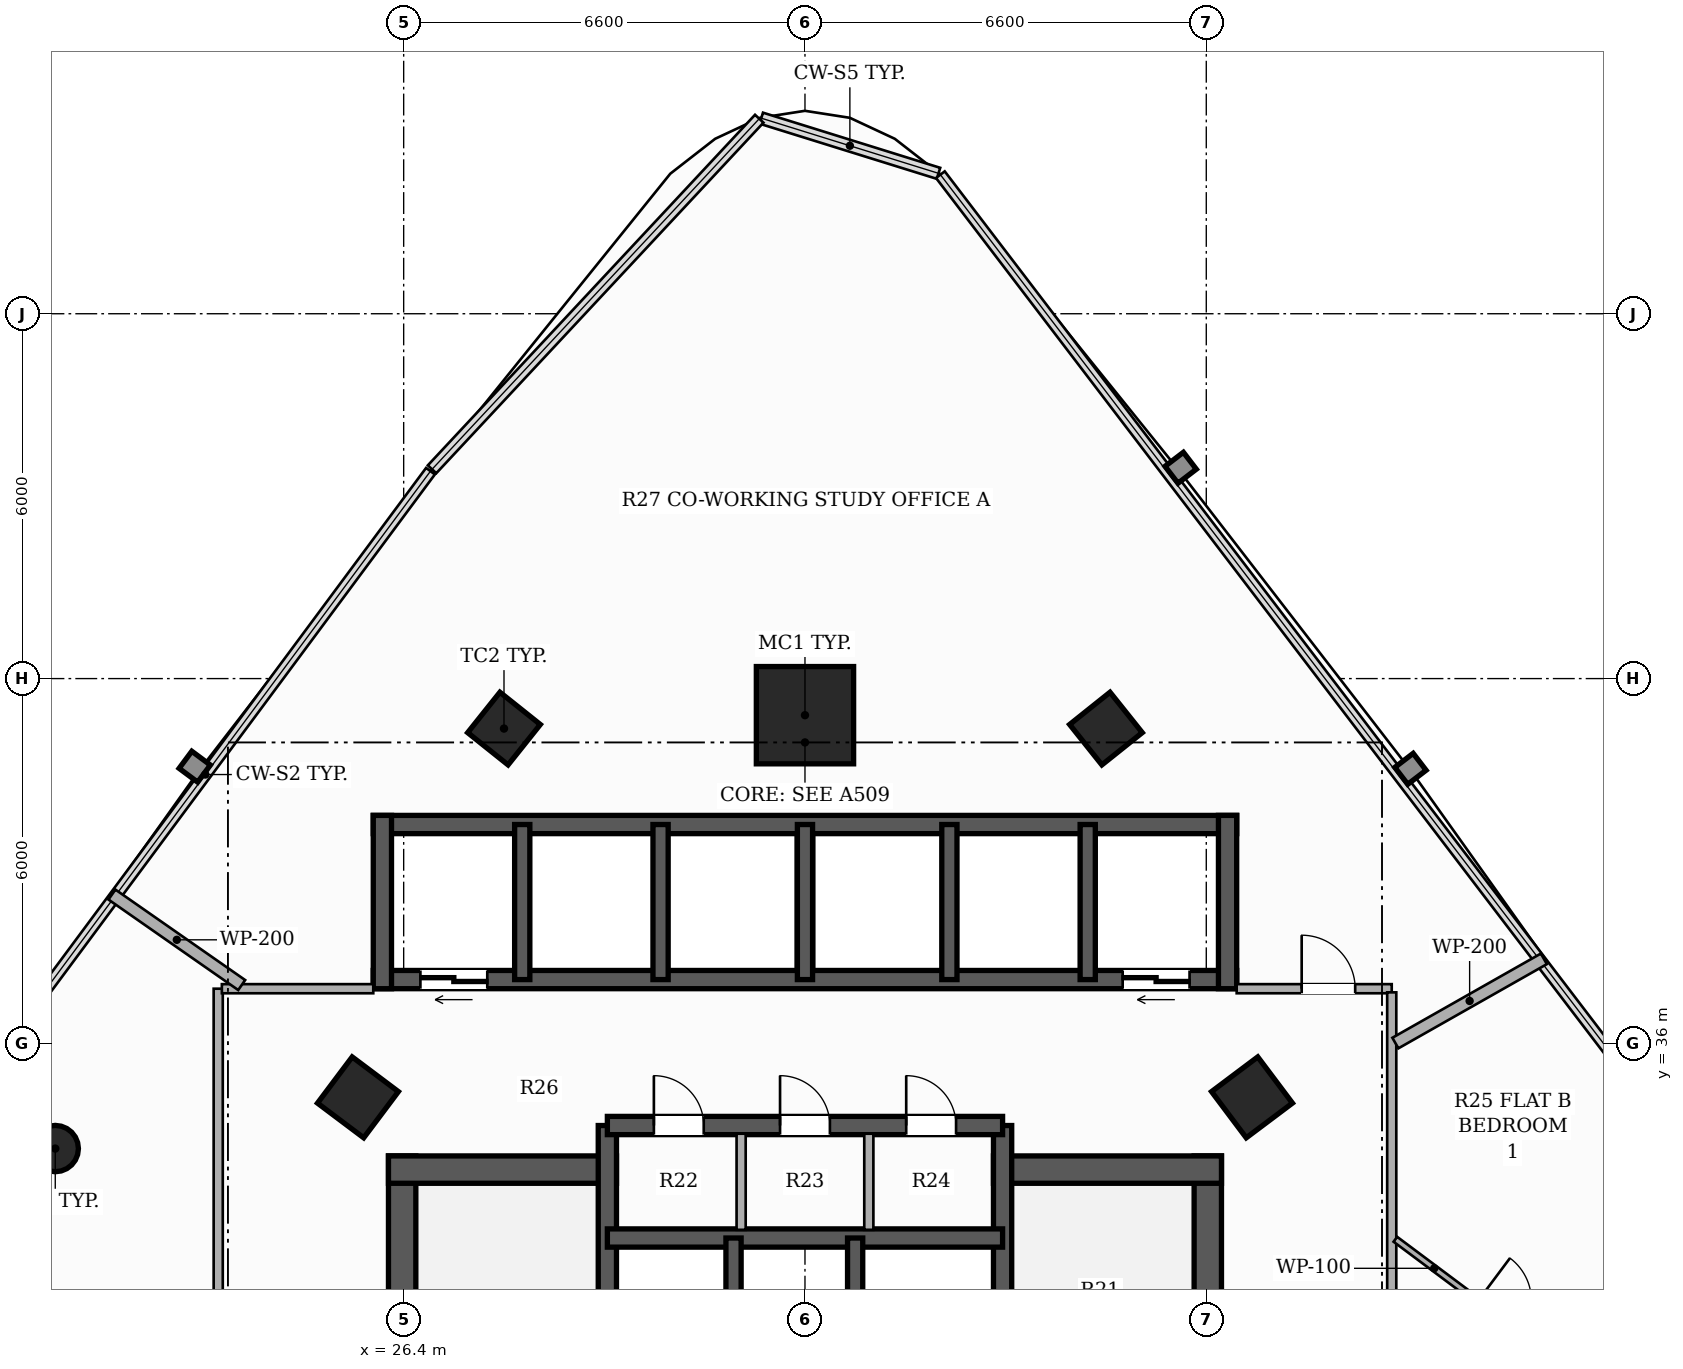
"""IFC4 building model, lengths in metres.
Left out: names, types, materials, properties, quantities, classifications, styles, units other than length and angle.
Written with IfcOpenShell. Run it as: python <this file> out.ifc"""

import sys

from ifc_helpers import new_model, si_unit, direction, frame, frame_2d, origin, origin_2d, place, context, subcontext, project, spatial, rectangle, hollow_rectangle, hollow_circle, extrude, element, fill, save


model = new_model("IFC4")
c1 = context("Model", 3, precision=1e-05, world=origin(), true_north=direction((0.0, 1.0)))
c2 = subcontext(c1, "Body", "Model", "MODEL_VIEW")
j1 = project(units=[si_unit("LENGTHUNIT", "METRE"), si_unit("PLANEANGLEUNIT", "RADIAN")], contexts=[c1])
p1 = place(None, origin())
s1 = spatial("IfcSite", under=j1, at=p1, CompositionType="ELEMENT")
p2 = place(p1, origin())
s2 = spatial("IfcBuilding", under=s1, at=p2, CompositionType="ELEMENT")
p3 = place(p2, frame((0.0, 0.0, 64.25)))
s3 = spatial("IfcBuildingStorey", under=s2, at=p3, CompositionType="ELEMENT", Elevation=64.25)
p4 = place(p3, frame((26.375, 26.45, 0.0), z_axis=(0.0, 0.0, 1.0), x_axis=(0.0, 1.0, 0.0)))
e1 = element("IfcWall", 1, at=p4, inside=s3, PredefinedType="SHEAR", context=c2, shape_type="SweptSolid", body=[
    extrude(rectangle(XDim=7.7, YDim=0.45, at=frame_2d((3.85, 0.0))), origin(), (0.0, 0.0, 1.0), 3.3),
])
p5 = place(p3, frame((26.15, 33.925, 0.0), z_axis=(0.0, 0.0, 1.0), x_axis=(1.0, 0.0, 0.0)))
e2 = element("IfcWall", 2, at=p5, inside=s3, PredefinedType="SHEAR", context=c2, shape_type="SweptSolid", body=[
    extrude(rectangle(XDim=3.75, YDim=0.45, at=frame_2d((1.875, 0.0))), origin(), (0.0, 0.0, 1.0), 3.3),
])
p6 = place(p3, frame((39.625, 26.45, 0.0), z_axis=(0.0, 0.0, 1.0), x_axis=(0.0, 1.0, 0.0)))
e3 = element("IfcWall", 3, at=p6, inside=s3, PredefinedType="SHEAR", context=c2, shape_type="SweptSolid", body=[
    extrude(rectangle(XDim=7.7, YDim=0.45, at=frame_2d((3.85, 0.0))), origin(), (0.0, 0.0, 1.0), 3.3),
])
p7 = place(p3, frame((36.1, 33.925, 0.0), z_axis=(0.0, 0.0, 1.0), x_axis=(1.0, 0.0, 0.0)))
e4 = element("IfcWall", 4, at=p7, inside=s3, PredefinedType="SHEAR", context=c2, shape_type="SweptSolid", body=[
    extrude(rectangle(XDim=3.75, YDim=0.45, at=frame_2d((1.875, 0.0))), origin(), (0.0, 0.0, 1.0), 3.3),
])
p8 = place(p3, frame((29.75, 26.45, 0.0), z_axis=(0.0, 0.0, 1.0), x_axis=(0.0, 1.0, 0.0)))
e5 = element("IfcWall", 5, at=p8, inside=s3, PredefinedType="SHEAR", context=c2, shape_type="SweptSolid", body=[
    extrude(rectangle(XDim=8.2, YDim=0.3, at=frame_2d((4.1, 0.0))), origin(), (0.0, 0.0, 1.0), 3.3),
])
p9 = place(p8, frame((0.6, 0.0, 0.0)))
e6 = element("IfcOpeningElement", 6, at=p9, cuts=e5, PredefinedType="OPENING", context=c2, shape_type="SweptSolid", body=[
    extrude(rectangle(XDim=1.05, YDim=2.15, at=frame_2d((0.525, 1.075))), frame((0.0, 0.16, 0.0), z_axis=(0.0, -1.0, 0.0), x_axis=(1.0, 0.0, 0.0)), (0.0, 0.0, 1.0), 0.32),
])
p10 = place(p3, frame((36.25, 26.45, 0.0), z_axis=(0.0, 0.0, 1.0), x_axis=(0.0, 1.0, 0.0)))
e7 = element("IfcWall", 7, at=p10, inside=s3, PredefinedType="SHEAR", context=c2, shape_type="SweptSolid", body=[
    extrude(rectangle(XDim=8.2, YDim=0.3, at=frame_2d((4.1, 0.0))), origin(), (0.0, 0.0, 1.0), 3.3),
])
p11 = place(p10, frame((0.6, 0.0, 0.0)))
e8 = element("IfcOpeningElement", 8, at=p11, cuts=e7, PredefinedType="OPENING", context=c2, shape_type="SweptSolid", body=[
    extrude(rectangle(XDim=1.05, YDim=2.15, at=frame_2d((0.525, 1.075))), frame((0.0, 0.16, 0.0), z_axis=(0.0, -1.0, 0.0), x_axis=(1.0, 0.0, 0.0)), (0.0, 0.0, 1.0), 0.32),
])
p12 = place(p3, frame((29.75, 32.8, 0.0), z_axis=(0.0, 0.0, 1.0), x_axis=(1.0, 0.0, 0.0)))
e9 = element("IfcWall", 9, at=p12, inside=s3, PredefinedType="SHEAR", context=c2, shape_type="SweptSolid", body=[
    extrude(rectangle(XDim=6.5, YDim=0.3, at=frame_2d((3.25, 0.0))), origin(), (0.0, 0.0, 1.0), 3.3),
])
for number, where, z_axis, x_axis in (
    (10, (31.825, 29.9, 0.0), (0.0, 0.0, 1.0), (0.0, 1.0, 0.0)),
    (11, (33.825, 29.9, 0.0), (0.0, 0.0, 1.0), (0.0, 1.0, 0.0)),
):
    element("IfcWall", number, at=place(p3, frame(where, z_axis=z_axis, x_axis=x_axis)), inside=s3, PredefinedType="SHEAR", context=c2, shape_type="SweptSolid", body=[
        extrude(rectangle(XDim=2.9, YDim=0.25, at=frame_2d((1.45, 0.0))), origin(), (0.0, 0.0, 1.0), 3.3),
    ])
p13 = place(p3, frame((29.75, 34.65, 0.0), z_axis=(0.0, 0.0, 1.0), x_axis=(1.0, 0.0, 0.0)))
e12 = element("IfcWall", 12, at=p13, inside=s3, PredefinedType="SHEAR", context=c2, shape_type="SweptSolid", body=[
    extrude(rectangle(XDim=6.5, YDim=0.3, at=frame_2d((3.25, 0.0))), origin(), (0.0, 0.0, 1.0), 3.3),
])
p14 = place(p13, frame((0.765, 0.0, 0.0)))
e13 = element("IfcOpeningElement", 13, at=p14, cuts=e12, PredefinedType="OPENING", context=c2, shape_type="SweptSolid", body=[
    extrude(rectangle(XDim=0.82, YDim=2.1, at=frame_2d((0.41, 1.05))), frame((0.0, 0.16, 0.0), z_axis=(0.0, -1.0, 0.0), x_axis=(1.0, 0.0, 0.0)), (0.0, 0.0, 1.0), 0.32),
])
p15 = place(p13, frame((2.84, 0.0, 0.0)))
e14 = element("IfcOpeningElement", 14, at=p15, cuts=e12, PredefinedType="OPENING", context=c2, shape_type="SweptSolid", body=[
    extrude(rectangle(XDim=0.82, YDim=2.1, at=frame_2d((0.41, 1.05))), frame((0.0, 0.16, 0.0), z_axis=(0.0, -1.0, 0.0), x_axis=(1.0, 0.0, 0.0)), (0.0, 0.0, 1.0), 0.32),
])
p16 = place(p13, frame((4.915, 0.0, 0.0)))
e15 = element("IfcOpeningElement", 15, at=p16, cuts=e12, PredefinedType="OPENING", context=c2, shape_type="SweptSolid", body=[
    extrude(rectangle(XDim=0.82, YDim=2.1, at=frame_2d((0.41, 1.05))), frame((0.0, 0.16, 0.0), z_axis=(0.0, -1.0, 0.0), x_axis=(1.0, 0.0, 0.0)), (0.0, 0.0, 1.0), 0.32),
])
p17 = place(p3, frame((40.1, 37.05, 0.0), z_axis=(0.0, 0.0, 1.0), x_axis=(-1.0, 0.0, 0.0)))
e16 = element("IfcWall", 16, at=p17, inside=s3, PredefinedType="SHEAR", context=c2, shape_type="SweptSolid", body=[
    extrude(rectangle(XDim=14.2, YDim=0.3, at=frame_2d((7.1, 0.0))), origin(), (0.0, 0.0, 1.0), 3.3),
])
p18 = place(p17, frame((12.325, 0.0, 0.0)))
e17 = element("IfcOpeningElement", 17, at=p18, cuts=e16, PredefinedType="OPENING", context=c2, shape_type="SweptSolid", body=[
    extrude(rectangle(XDim=1.1, YDim=2.2, at=frame_2d((0.55, 1.1))), frame((0.0, 0.16, 0.0), z_axis=(0.0, -1.0, 0.0), x_axis=(1.0, 0.0, 0.0)), (0.0, 0.0, 1.0), 0.32),
])
p19 = place(p17, frame((0.775, 0.0, 0.0)))
e18 = element("IfcOpeningElement", 18, at=p19, cuts=e16, PredefinedType="OPENING", context=c2, shape_type="SweptSolid", body=[
    extrude(rectangle(XDim=1.1, YDim=2.2, at=frame_2d((0.55, 1.1))), frame((0.0, 0.16, 0.0), z_axis=(0.0, -1.0, 0.0), x_axis=(1.0, 0.0, 0.0)), (0.0, 0.0, 1.0), 0.32),
])
p20 = place(p3, frame((25.9, 39.6, 0.0), z_axis=(0.0, 0.0, 1.0), x_axis=(1.0, 0.0, 0.0)))
e19 = element("IfcWall", 19, at=p20, inside=s3, PredefinedType="SHEAR", context=c2, shape_type="SweptSolid", body=[
    extrude(rectangle(XDim=14.2, YDim=0.3, at=frame_2d((7.1, 0.0))), origin(), (0.0, 0.0, 1.0), 3.3),
])
for number, where, z_axis, x_axis in (
    (20, (26.05, 36.9, 0.0), (0.0, 0.0, 1.0), (0.0, 1.0, 0.0)),
    (21, (39.95, 36.9, 0.0), (0.0, 0.0, 1.0), (0.0, 1.0, 0.0)),
):
    element("IfcWall", number, at=place(p3, frame(where, z_axis=z_axis, x_axis=x_axis)), inside=s3, PredefinedType="SHEAR", context=c2, shape_type="SweptSolid", body=[
        extrude(rectangle(XDim=2.85, YDim=0.3, at=frame_2d((1.425, 0.0))), origin(), (0.0, 0.0, 1.0), 3.3),
    ])
for number, where, z_axis, x_axis in (
    (22, (28.35, 37.05, 0.0), (0.0, 0.0, 1.0), (0.0, 1.0, 0.0)),
    (23, (30.625, 37.05, 0.0), (0.0, 0.0, 1.0), (0.0, 1.0, 0.0)),
    (24, (33.0, 37.05, 0.0), (0.0, 0.0, 1.0), (0.0, 1.0, 0.0)),
    (25, (35.375, 37.05, 0.0), (0.0, 0.0, 1.0), (0.0, 1.0, 0.0)),
    (26, (37.65, 37.05, 0.0), (0.0, 0.0, 1.0), (0.0, 1.0, 0.0)),
):
    element("IfcWall", number, at=place(p3, frame(where, z_axis=z_axis, x_axis=x_axis)), inside=s3, PredefinedType="SHEAR", context=c2, shape_type="SweptSolid", body=[
        extrude(rectangle(XDim=2.55, YDim=0.25, at=frame_2d((1.275, 0.0))), origin(), (0.0, 0.0, 1.0), 3.3),
    ])
p21 = place(p3, frame((33.0, 41.398, 0.0), z_axis=(0.0, 0.0, 1.0), x_axis=(1.0, 0.0, 0.0)))
e27 = element("IfcColumn", 27, at=p21, inside=s3, PredefinedType="COLUMN", context=c2, shape_type="SweptSolid", body=[
    extrude(hollow_rectangle(XDim=1.6, YDim=1.6, WallThickness=0.05, at=origin_2d()), origin(), (0.0, 0.0, 1.0), 3.3),
])
for number, where, z_axis, x_axis in (
    (28, (25.648, 35.113, 0.0), (0.0, 0.0, 1.0), (0.6, 0.8, 0.0)),
    (29, (40.352, 35.113, 0.0), (0.0, 0.0, 1.0), (-0.6, 0.8, 0.0)),
):
    element("IfcColumn", number, at=place(p3, frame(where, z_axis=z_axis, x_axis=x_axis)), inside=s3, PredefinedType="COLUMN", context=c2, shape_type="SweptSolid", body=[
        extrude(hollow_rectangle(XDim=0.95, YDim=0.95, WallThickness=0.032, at=origin_2d()), origin(), (0.0, 0.0, 1.0), 3.3),
    ])
for number, where, z_axis, x_axis in (
    (30, (28.05, 41.178, 0.0), (0.0, 0.0, 1.0), (0.624, 0.782, 0.0)),
    (31, (37.95, 41.178, 0.0), (0.0, 0.0, 1.0), (-0.624, 0.782, 0.0)),
):
    element("IfcColumn", number, at=place(p3, frame(where, z_axis=z_axis, x_axis=x_axis)), inside=s3, PredefinedType="COLUMN", context=c2, shape_type="SweptSolid", body=[
        extrude(hollow_rectangle(XDim=0.85, YDim=0.85, WallThickness=0.028, at=origin_2d()), origin(), (0.0, 0.0, 1.0), 3.3),
    ])
p22 = place(p3, frame((20.67, 34.271, 0.0), z_axis=(0.0, 0.0, 1.0), x_axis=(1.0, 0.0, 0.0)))
e32 = element("IfcColumn", 32, at=p22, inside=s3, PredefinedType="COLUMN", context=c2, shape_type="SweptSolid", body=[
    extrude(hollow_circle(Radius=0.381, WallThickness=0.022, at=origin_2d()), origin(), (0.0, 0.0, 1.0), 3.3),
])
for number, where, z_axis, x_axis in (
    (33, (31.95, 32.935, 0.0), (0.0, 0.0, 1.0), (0.0, 1.0, 0.0)),
    (34, (34.05, 32.935, 0.0), (0.0, 0.0, 1.0), (0.0, 1.0, 0.0)),
):
    element("IfcWall", number, at=place(p3, frame(where, z_axis=z_axis, x_axis=x_axis)), inside=s3, PredefinedType="PARTITIONING", context=c2, shape_type="SweptSolid", body=[
        extrude(rectangle(XDim=1.58, YDim=0.15, at=frame_2d((0.79, 0.0))), origin(), (0.0, 0.0, 1.0), 3.06),
    ])
p23 = place(p3, frame((40.1, 36.9, 0.0), z_axis=(0.0, 0.0, 1.0), x_axis=(1.0, 0.0, 0.0)))
e35 = element("IfcWall", 35, at=p23, inside=s3, PredefinedType="PARTITIONING", context=c2, shape_type="SweptSolid", body=[
    extrude(rectangle(XDim=2.55, YDim=0.15, at=frame_2d((1.275, 0.0))), origin(), (0.0, 0.0, 1.0), 2.413),
])
p24 = place(p23, frame((1.069, 0.0, 0.0)))
e36 = element("IfcOpeningElement", 36, at=p24, cuts=e35, PredefinedType="OPENING", context=c2, shape_type="SweptSolid", body=[
    extrude(rectangle(XDim=0.88, YDim=2.1, at=frame_2d((0.44, 1.05))), frame((0.0, 0.085, 0.0), z_axis=(0.0, -1.0, 0.0), x_axis=(1.0, 0.0, 0.0)), (0.0, 0.0, 1.0), 0.17),
])
p25 = place(p3, frame((42.65, 36.84, 0.0), z_axis=(0.0, 0.0, 1.0), x_axis=(0.0, -1.0, 0.0)))
e37 = element("IfcWall", 37, at=p25, inside=s3, PredefinedType="PARTITIONING", context=c2, shape_type="SweptSolid", body=[
    extrude(rectangle(XDim=25.04, YDim=0.15, at=frame_2d((12.52, 0.0))), origin(), (0.0, 0.0, 1.0), 2.413),
])
p26 = place(p25, frame((6.577, 0.0, 0.0)))
e38 = element("IfcOpeningElement", 38, at=p26, cuts=e37, PredefinedType="OPENING", context=c2, shape_type="SweptSolid", body=[
    extrude(rectangle(XDim=0.92, YDim=2.15, at=frame_2d((0.46, 1.075))), frame((0.0, 0.085, 0.0), z_axis=(0.0, -1.0, 0.0), x_axis=(1.0, 0.0, 0.0)), (0.0, 0.0, 1.0), 0.17),
])
p27 = place(p25, frame((19.777, 0.0, 0.0)))
e39 = element("IfcOpeningElement", 39, at=p27, cuts=e37, PredefinedType="OPENING", context=c2, shape_type="SweptSolid", body=[
    extrude(rectangle(XDim=0.88, YDim=2.1, at=frame_2d((0.44, 1.05))), frame((0.0, 0.085, 0.0), z_axis=(0.0, -1.0, 0.0), x_axis=(1.0, 0.0, 0.0)), (0.0, 0.0, 1.0), 0.17),
])
p28 = place(p25, frame((14.193, 0.0, 0.0)))
e40 = element("IfcOpeningElement", 40, at=p28, cuts=e37, PredefinedType="OPENING", context=c2, shape_type="SweptSolid", body=[
    extrude(rectangle(XDim=0.88, YDim=2.1, at=frame_2d((0.44, 1.05))), frame((0.0, 0.085, 0.0), z_axis=(0.0, -1.0, 0.0), x_axis=(1.0, 0.0, 0.0)), (0.0, 0.0, 1.0), 0.17),
])
p29 = place(p3, frame((23.35, 11.86, 0.0), z_axis=(0.0, 0.0, 1.0), x_axis=(0.0, 1.0, 0.0)))
e41 = element("IfcWall", 41, at=p29, inside=s3, PredefinedType="PARTITIONING", context=c2, shape_type="SweptSolid", body=[
    extrude(rectangle(XDim=25.04, YDim=0.15, at=frame_2d((12.52, 0.0))), origin(), (0.0, 0.0, 1.0), 2.413),
])
p30 = place(p29, frame((18.154, 0.0, 0.0)))
e42 = element("IfcOpeningElement", 42, at=p30, cuts=e41, PredefinedType="OPENING", context=c2, shape_type="SweptSolid", body=[
    extrude(rectangle(XDim=0.88, YDim=2.1, at=frame_2d((0.44, 1.05))), frame((0.0, 0.085, 0.0), z_axis=(0.0, -1.0, 0.0), x_axis=(1.0, 0.0, 0.0)), (0.0, 0.0, 1.0), 0.17),
])
p31 = place(p29, frame((10.346, 0.0, 0.0)))
e43 = element("IfcOpeningElement", 43, at=p31, cuts=e41, PredefinedType="OPENING", context=c2, shape_type="SweptSolid", body=[
    extrude(rectangle(XDim=0.88, YDim=2.1, at=frame_2d((0.44, 1.05))), frame((0.0, 0.085, 0.0), z_axis=(0.0, -1.0, 0.0), x_axis=(1.0, 0.0, 0.0)), (0.0, 0.0, 1.0), 0.17),
])
p32 = place(p29, frame((6.32, 0.0, 0.0)))
e44 = element("IfcOpeningElement", 44, at=p32, cuts=e41, PredefinedType="OPENING", context=c2, shape_type="SweptSolid", body=[
    extrude(rectangle(XDim=0.88, YDim=2.1, at=frame_2d((0.44, 1.05))), frame((0.0, 0.085, 0.0), z_axis=(0.0, -1.0, 0.0), x_axis=(1.0, 0.0, 0.0)), (0.0, 0.0, 1.0), 0.17),
])
p33 = place(p29, frame((1.719, 0.0, 0.0)))
e45 = element("IfcOpeningElement", 45, at=p33, cuts=e41, PredefinedType="OPENING", context=c2, shape_type="SweptSolid", body=[
    extrude(rectangle(XDim=0.88, YDim=2.1, at=frame_2d((0.44, 1.05))), frame((0.0, 0.085, 0.0), z_axis=(0.0, -1.0, 0.0), x_axis=(1.0, 0.0, 0.0)), (0.0, 0.0, 1.0), 0.17),
])
p34 = place(p3, frame((23.41, 36.9, 0.0), z_axis=(0.0, 0.0, 1.0), x_axis=(1.0, 0.0, 0.0)))
e46 = element("IfcWall", 46, at=p34, inside=s3, PredefinedType="PARTITIONING", context=c2, shape_type="SweptSolid", body=[
    extrude(rectangle(XDim=2.49, YDim=0.15, at=frame_2d((1.245, 0.0))), origin(), (0.0, 0.0, 1.0), 2.413),
])
p35 = place(p3, frame((45.152, 37.391, 0.0), z_axis=(0.0, 0.0, 1.0), x_axis=(-0.86984931175, -0.4933175193, 0.0)))
e47 = element("IfcWall", 47, at=p35, inside=s3, PredefinedType="PARTITIONING", context=c2, shape_type="SweptSolid", body=[
    extrude(rectangle(XDim=2.808, YDim=0.2, at=frame_2d((1.404, 0.0))), origin(), (0.0, 0.0, 1.0), 2.619),
])
p36 = place(p3, frame((23.736, 36.96, 0.0), z_axis=(0.0, 0.0, 1.0), x_axis=(-0.820275422115, 0.571968733302, 0.0)))
e48 = element("IfcWall", 48, at=p36, inside=s3, PredefinedType="PARTITIONING", context=c2, shape_type="SweptSolid", body=[
    extrude(rectangle(XDim=2.602, YDim=0.2, at=frame_2d((1.301, 0.0))), origin(), (0.0, 0.0, 1.0), 3.06),
])
p37 = place(p3, frame((42.71, 32.779, 0.0), z_axis=(0.0, 0.0, 1.0), x_axis=(0.801226493917, -0.598361183104, 0.0)))
e49 = element("IfcWall", 49, at=p37, inside=s3, PredefinedType="PARTITIONING", context=c2, shape_type="SweptSolid", body=[
    extrude(rectangle(XDim=4.27, YDim=0.1, at=frame_2d((2.135, 0.0))), origin(), (0.0, 0.0, 1.0), 3.06),
])
p38 = place(p37, frame((1.695, 0.0, 0.0)))
e50 = element("IfcOpeningElement", 50, at=p38, cuts=e49, PredefinedType="OPENING", context=c2, shape_type="SweptSolid", body=[
    extrude(rectangle(XDim=0.88, YDim=2.1, at=frame_2d((0.44, 1.05))), frame((0.0, 0.06, 0.0), z_axis=(0.0, -1.0, 0.0), x_axis=(1.0, 0.0, 0.0)), (0.0, 0.0, 1.0), 0.12),
])
p39 = place(p3, frame((46.131, 30.224, 0.0), z_axis=(0.0, 0.0, 1.0), x_axis=(0.598226648312, 0.801326947787, 0.0)))
e51 = element("IfcWall", 51, at=p39, inside=s3, PredefinedType="PARTITIONING", context=c2, shape_type="SweptSolid", body=[
    extrude(rectangle(XDim=3.373, YDim=0.12, at=frame_2d((1.687, 0.0))), origin(), (0.0, 0.0, 1.0), 3.06),
])
p40 = place(p18, origin())
e52 = element("IfcDoor", 52, at=p40, inside=s3, OperationType="DOUBLE_DOOR_SLIDING", PredefinedType="DOOR", context=c2, shape_type="SweptSolid", body=[
    extrude(rectangle(XDim=1.1, YDim=2.2, at=frame_2d((0.55, 1.1))), frame((0.0, 0.025, 0.0), z_axis=(0.0, -1.0, 0.0), x_axis=(1.0, 0.0, 0.0)), (0.0, 0.0, 1.0), 0.05),
])
fill(e17, e52)
p41 = place(p19, origin())
e53 = element("IfcDoor", 53, at=p41, inside=s3, OperationType="DOUBLE_DOOR_SLIDING", PredefinedType="DOOR", context=c2, shape_type="SweptSolid", body=[
    extrude(rectangle(XDim=1.1, YDim=2.2, at=frame_2d((0.55, 1.1))), frame((0.0, 0.025, 0.0), z_axis=(0.0, -1.0, 0.0), x_axis=(1.0, 0.0, 0.0)), (0.0, 0.0, 1.0), 0.05),
])
fill(e18, e53)
p42 = place(p14, origin())
e54 = element("IfcDoor", 54, at=p42, inside=s3, OperationType="SINGLE_SWING_LEFT", PredefinedType="DOOR", context=c2, shape_type="SweptSolid", body=[
    extrude(rectangle(XDim=0.82, YDim=2.1, at=frame_2d((0.41, 1.05))), frame((0.0, 0.025, 0.0), z_axis=(0.0, -1.0, 0.0), x_axis=(1.0, 0.0, 0.0)), (0.0, 0.0, 1.0), 0.05),
])
fill(e13, e54)
p43 = place(p15, origin())
e55 = element("IfcDoor", 55, at=p43, inside=s3, OperationType="SINGLE_SWING_LEFT", PredefinedType="DOOR", context=c2, shape_type="SweptSolid", body=[
    extrude(rectangle(XDim=0.82, YDim=2.1, at=frame_2d((0.41, 1.05))), frame((0.0, 0.025, 0.0), z_axis=(0.0, -1.0, 0.0), x_axis=(1.0, 0.0, 0.0)), (0.0, 0.0, 1.0), 0.05),
])
fill(e14, e55)
p44 = place(p16, origin())
e56 = element("IfcDoor", 56, at=p44, inside=s3, OperationType="SINGLE_SWING_LEFT", PredefinedType="DOOR", context=c2, shape_type="SweptSolid", body=[
    extrude(rectangle(XDim=0.82, YDim=2.1, at=frame_2d((0.41, 1.05))), frame((0.0, 0.025, 0.0), z_axis=(0.0, -1.0, 0.0), x_axis=(1.0, 0.0, 0.0)), (0.0, 0.0, 1.0), 0.05),
])
fill(e15, e56)
p45 = place(p24, origin())
e57 = element("IfcDoor", 57, at=p45, inside=s3, OperationType="SINGLE_SWING_LEFT", PredefinedType="DOOR", context=c2, shape_type="SweptSolid", body=[
    extrude(rectangle(XDim=0.88, YDim=2.1, at=frame_2d((0.44, 1.05))), frame((0.0, 0.025, 0.0), z_axis=(0.0, -1.0, 0.0), x_axis=(1.0, 0.0, 0.0)), (0.0, 0.0, 1.0), 0.05),
])
fill(e36, e57)
save(model, sys.argv[1])
